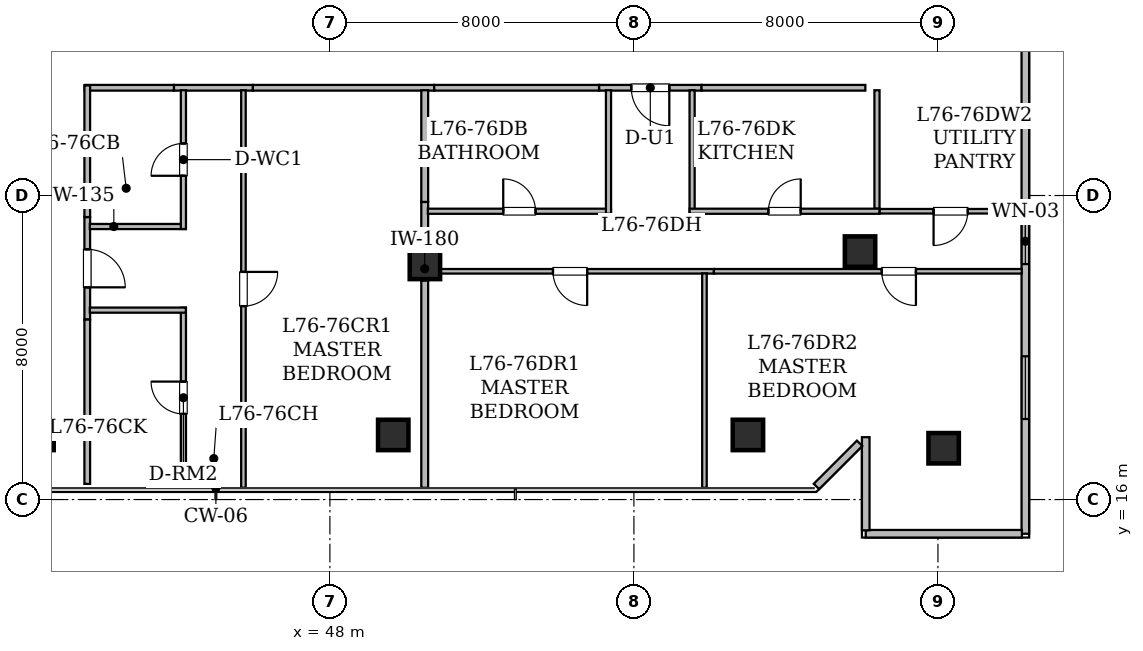
"""IFC4 building model, lengths in metres.
Left out: names, types, materials, properties, quantities, classifications, styles, units other than length and angle.
Written with IfcOpenShell. Run it as: python <this file> out.ifc"""

import sys

from ifc_helpers import new_model, si_unit, direction, frame, frame_2d, origin, origin_2d, place, context, subcontext, project, spatial, rectangle, hollow_rectangle, extrude, element, fill, save


model = new_model("IFC4")
c1 = context("Model", 3, precision=1e-05, world=origin(), true_north=direction((0.0, 1.0)))
c2 = subcontext(c1, "Body", "Model", "MODEL_VIEW")
j1 = project(units=[si_unit("LENGTHUNIT", "METRE"), si_unit("PLANEANGLEUNIT", "RADIAN")], contexts=[c1])
p1 = place(None, origin())
s1 = spatial("IfcSite", under=j1, at=p1, CompositionType="ELEMENT")
p2 = place(p1, origin())
s2 = spatial("IfcBuilding", under=s1, at=p2, CompositionType="ELEMENT")
p3 = place(p2, frame((0.0, 0.0, 298.85)))
s3 = spatial("IfcBuildingStorey", under=s2, at=p3, CompositionType="ELEMENT", Elevation=298.85)
for number, where, z_axis, x_axis in (
    (1, (40.333, 17.7, 0.0), (0.0, 0.0, 1.0), (1.0, 0.0, 0.0)),
    (2, (49.667, 17.7, 0.0), (0.0, 0.0, 1.0), (1.0, 0.0, 0.0)),
    (3, (59.0, 17.7, 0.0), (0.0, 0.0, 1.0), (1.0, 0.0, 0.0)),
    (4, (61.95, 22.525, 0.0), (0.0, 0.0, 1.0), (1.0, 0.0, 0.0)),
    (5, (50.5, 22.2, 0.0), (0.0, 0.0, 1.0), (1.0, 0.0, 0.0)),
):
    element("IfcColumn", number, at=place(p3, frame(where, z_axis=z_axis, x_axis=x_axis)), inside=s3, PredefinedType="COLUMN", context=c2, shape_type="SweptSolid", body=[
        extrude(hollow_rectangle(XDim=0.8, YDim=0.8, WallThickness=0.04, at=origin_2d()), origin(), (0.0, 0.0, 1.0), 4.2),
    ])
p4 = place(p3, frame((64.15, 17.35, 0.0), z_axis=(0.0, 0.0, 1.0), x_axis=(1.0, 0.0, 0.0)))
e6 = element("IfcColumn", 6, at=p4, inside=s3, PredefinedType="COLUMN", context=c2, shape_type="SweptSolid", body=[
    extrude(hollow_rectangle(XDim=0.8, YDim=0.8, WallThickness=0.04, at=origin_2d()), origin(), (0.0, 0.0, 1.0), 4.175),
])
p5 = place(p3, frame((66.3, 40.81, 0.0), z_axis=(0.0, 0.0, 1.0), x_axis=(0.0, -1.0, 0.0)))
e7 = element("IfcWall", 7, at=p5, inside=s3, PredefinedType="STANDARD", context=c2, shape_type="SweptSolid", body=[
    extrude(rectangle(XDim=25.71, YDim=0.2, at=frame_2d((12.855, 0.0))), origin(), (0.0, 0.0, 1.0), 3.33),
])
p6 = place(p5, frame((5.39, 0.0, 0.85)))
e8 = element("IfcOpeningElement", 8, at=p6, cuts=e7, PredefinedType="OPENING", context=c2, shape_type="SweptSolid", body=[
    extrude(rectangle(XDim=1.65, YDim=1.55, at=frame_2d((0.825, 0.775))), frame((0.0, 0.11, 0.0), z_axis=(0.0, -1.0, 0.0), x_axis=(1.0, 0.0, 0.0)), (0.0, 0.0, 1.0), 0.22),
])
p7 = place(p5, frame((17.414, 0.0, 0.8)))
e9 = element("IfcOpeningElement", 9, at=p7, cuts=e7, PredefinedType="OPENING", context=c2, shape_type="SweptSolid", body=[
    extrude(rectangle(XDim=1.2, YDim=1.5, at=frame_2d((0.6, 0.75))), frame((0.0, 0.11, 0.0), z_axis=(0.0, -1.0, 0.0), x_axis=(1.0, 0.0, 0.0)), (0.0, 0.0, 1.0), 0.22),
])
p8 = place(p5, frame((21.04, 0.0, 0.85)))
e10 = element("IfcOpeningElement", 10, at=p8, cuts=e7, PredefinedType="OPENING", context=c2, shape_type="SweptSolid", body=[
    extrude(rectangle(XDim=1.65, YDim=1.55, at=frame_2d((0.825, 0.775))), frame((0.0, 0.11, 0.0), z_axis=(0.0, -1.0, 0.0), x_axis=(1.0, 0.0, 0.0)), (0.0, 0.0, 1.0), 0.22),
])
p9 = place(p3, frame((66.21, 15.1, 0.0), z_axis=(0.0, 0.0, 1.0), x_axis=(-1.0, 0.0, 0.0)))
e11 = element("IfcWall", 11, at=p9, inside=s3, PredefinedType="STANDARD", context=c2, shape_type="SweptSolid", body=[
    extrude(rectangle(XDim=4.11, YDim=0.2, at=frame_2d((2.055, 0.0))), origin(), (0.0, 0.0, 1.0), 3.33),
])
p10 = place(p3, frame((62.1, 15.19, 0.0), z_axis=(0.0, 0.0, 1.0), x_axis=(0.0, 1.0, 0.0)))
e12 = element("IfcWall", 12, at=p10, inside=s3, PredefinedType="STANDARD", context=c2, shape_type="SweptSolid", body=[
    extrude(rectangle(XDim=2.451, YDim=0.2, at=frame_2d((1.226, 0.0))), origin(), (0.0, 0.0, 1.0), 3.33),
])
p11 = place(p3, frame((61.939, 17.48, 0.0), z_axis=(0.0, 0.0, 1.0), x_axis=(-0.707106781187, -0.707106781187, 0.0)))
e13 = element("IfcWall", 13, at=p11, inside=s3, PredefinedType="STANDARD", context=c2, shape_type="SweptSolid", body=[
    extrude(rectangle(XDim=1.606, YDim=0.2, at=frame_2d((0.803, 0.0))), origin(), (0.0, 0.0, 1.0), 3.33),
])
p12 = place(p3, frame((45.974, 26.835, 0.0), z_axis=(0.0, 0.0, 1.0), x_axis=(-1.0, 0.0, 0.0)))
e14 = element("IfcWall", 14, at=p12, inside=s3, PredefinedType="STANDARD", context=c2, shape_type="SweptSolid", body=[
    extrude(rectangle(XDim=2.078, YDim=0.15, at=frame_2d((1.039, 0.0))), origin(), (0.0, 0.0, 1.0), 3.88),
])
p13 = place(p3, frame((41.615, 23.433, 0.0), z_axis=(0.0, 0.0, 1.0), x_axis=(0.0, -1.0, 0.0)))
e15 = element("IfcWall", 15, at=p13, inside=s3, PredefinedType="STANDARD", context=c2, shape_type="SweptSolid", body=[
    extrude(rectangle(XDim=2.698, YDim=0.15, at=frame_2d((1.349, 0.0))), origin(), (0.0, 0.0, 1.0), 3.88),
])
p14 = place(p13, frame((0.849, 0.0, 0.0)))
e16 = element("IfcOpeningElement", 16, at=p14, cuts=e15, PredefinedType="OPENING", context=c2, shape_type="SweptSolid", body=[
    extrude(rectangle(XDim=1.0, YDim=2.15, at=frame_2d((0.5, 1.075))), frame((0.0, 0.085, 0.0), z_axis=(0.0, -1.0, 0.0), x_axis=(1.0, 0.0, 0.0)), (0.0, 0.0, 1.0), 0.17),
])
p15 = place(p3, frame((43.896, 26.835, 0.0), z_axis=(0.0, 0.0, 1.0), x_axis=(-1.0, 0.0, 0.0)))
e17 = element("IfcWall", 17, at=p15, inside=s3, PredefinedType="STANDARD", context=c2, shape_type="SweptSolid", body=[
    extrude(rectangle(XDim=2.346, YDim=0.15, at=frame_2d((1.173, 0.0))), origin(), (0.0, 0.0, 1.0), 3.88),
])
p16 = place(p3, frame((41.615, 26.898, 0.0), z_axis=(0.0, 0.0, 1.0), x_axis=(0.0, -1.0, 0.0)))
e18 = element("IfcWall", 18, at=p16, inside=s3, PredefinedType="STANDARD", context=c2, shape_type="SweptSolid", body=[
    extrude(rectangle(XDim=3.465, YDim=0.15, at=frame_2d((1.732, 0.0))), origin(), (0.0, 0.0, 1.0), 3.175),
])
p17 = place(p3, frame((41.615, 20.735, 0.0), z_axis=(0.0, 0.0, 1.0), x_axis=(0.0, -1.0, 0.0)))
e19 = element("IfcWall", 19, at=p17, inside=s3, PredefinedType="STANDARD", context=c2, shape_type="SweptSolid", body=[
    extrude(rectangle(XDim=4.323, YDim=0.15, at=frame_2d((2.162, 0.0))), origin(), (0.0, 0.0, 1.0), 3.337),
])
p18 = place(p3, frame((50.744, 26.835, 0.0), z_axis=(0.0, 0.0, 1.0), x_axis=(-1.0, 0.0, 0.0)))
e20 = element("IfcWall", 20, at=p18, inside=s3, PredefinedType="STANDARD", context=c2, shape_type="SweptSolid", body=[
    extrude(rectangle(XDim=4.77, YDim=0.15, at=frame_2d((2.385, 0.0))), origin(), (0.0, 0.0, 1.0), 3.175),
])
p19 = place(p3, frame((57.78, 26.835, 0.0), z_axis=(0.0, 0.0, 1.0), x_axis=(-1.0, 0.0, 0.0)))
e21 = element("IfcWall", 21, at=p19, inside=s3, PredefinedType="STANDARD", context=c2, shape_type="SweptSolid", body=[
    extrude(rectangle(XDim=2.698, YDim=0.15, at=frame_2d((1.349, 0.0))), origin(), (0.0, 0.0, 1.0), 3.88),
])
p20 = place(p19, frame((0.849, 0.0, 0.0)))
e22 = element("IfcOpeningElement", 22, at=p20, cuts=e21, PredefinedType="OPENING", context=c2, shape_type="SweptSolid", body=[
    extrude(rectangle(XDim=1.0, YDim=2.15, at=frame_2d((0.5, 1.075))), frame((0.0, 0.085, 0.0), z_axis=(0.0, -1.0, 0.0), x_axis=(1.0, 0.0, 0.0)), (0.0, 0.0, 1.0), 0.17),
])
p21 = place(p3, frame((55.082, 26.835, 0.0), z_axis=(0.0, 0.0, 1.0), x_axis=(-1.0, 0.0, 0.0)))
e23 = element("IfcWall", 23, at=p21, inside=s3, PredefinedType="STANDARD", context=c2, shape_type="SweptSolid", body=[
    extrude(rectangle(XDim=4.338, YDim=0.15, at=frame_2d((2.169, 0.0))), origin(), (0.0, 0.0, 1.0), 3.88),
])
p22 = place(p3, frame((62.09, 26.835, 0.0), z_axis=(0.0, 0.0, 1.0), x_axis=(-1.0, 0.0, 0.0)))
e24 = element("IfcWall", 24, at=p22, inside=s3, PredefinedType="STANDARD", context=c2, shape_type="SweptSolid", body=[
    extrude(rectangle(XDim=4.31, YDim=0.15, at=frame_2d((2.155, 0.0))), origin(), (0.0, 0.0, 1.0), 3.337),
])
p23 = place(p3, frame((41.682, 23.184, 0.0), z_axis=(0.0, 0.0, 1.0), x_axis=(1.0, 0.0, 0.0)))
e25 = element("IfcWall", 25, at=p23, inside=s3, PredefinedType="PARTITIONING", context=c2, shape_type="SweptSolid", body=[
    extrude(rectangle(XDim=2.528, YDim=0.135, at=frame_2d((1.264, 0.0))), origin(), (0.0, 0.0, 1.0), 3.175),
])
p24 = place(p3, frame((44.145, 23.119, 0.0), z_axis=(0.0, 0.0, 1.0), x_axis=(0.0, 1.0, 0.0)))
e26 = element("IfcWall", 26, at=p24, inside=s3, PredefinedType="PARTITIONING", context=c2, shape_type="SweptSolid", body=[
    extrude(rectangle(XDim=3.651, YDim=0.135, at=frame_2d((1.826, 0.0))), origin(), (0.0, 0.0, 1.0), 3.175),
])
p25 = place(p24, frame((1.4, 0.0, 0.0)))
e27 = element("IfcOpeningElement", 27, at=p25, cuts=e26, PredefinedType="OPENING", context=c2, shape_type="SweptSolid", body=[
    extrude(rectangle(XDim=0.85, YDim=2.1, at=frame_2d((0.425, 1.05))), frame((0.0, 0.077, 0.0), z_axis=(0.0, -1.0, 0.0), x_axis=(1.0, 0.0, 0.0)), (0.0, 0.0, 1.0), 0.155),
])
p26 = place(p3, frame((44.145, 16.31, 0.0), z_axis=(0.0, 0.0, 1.0), x_axis=(0.0, 1.0, 0.0)))
e28 = element("IfcWall", 28, at=p26, inside=s3, PredefinedType="PARTITIONING", context=c2, shape_type="SweptSolid", body=[
    extrude(rectangle(XDim=4.739, YDim=0.135, at=frame_2d((2.37, 0.0))), origin(), (0.0, 0.0, 1.0), 3.337),
])
p27 = place(p26, frame((1.944, 0.0, 0.0)))
e29 = element("IfcOpeningElement", 29, at=p27, cuts=e28, PredefinedType="OPENING", context=c2, shape_type="SweptSolid", body=[
    extrude(rectangle(XDim=0.85, YDim=2.1, at=frame_2d((0.425, 1.05))), frame((0.0, 0.077, 0.0), z_axis=(0.0, -1.0, 0.0), x_axis=(1.0, 0.0, 0.0)), (0.0, 0.0, 1.0), 0.155),
])
p28 = place(p3, frame((44.21, 20.984, 0.0), z_axis=(0.0, 0.0, 1.0), x_axis=(-1.0, 0.0, 0.0)))
e30 = element("IfcWall", 30, at=p28, inside=s3, PredefinedType="PARTITIONING", context=c2, shape_type="SweptSolid", body=[
    extrude(rectangle(XDim=2.528, YDim=0.135, at=frame_2d((1.264, 0.0))), origin(), (0.0, 0.0, 1.0), 3.88),
])
p29 = place(p3, frame((45.725, 26.77, 0.0), z_axis=(0.0, 0.0, 1.0), x_axis=(0.0, -1.0, 0.0)))
e31 = element("IfcWall", 31, at=p29, inside=s3, PredefinedType="PARTITIONING", context=c2, shape_type="SweptSolid", body=[
    extrude(rectangle(XDim=10.46, YDim=0.12, at=frame_2d((5.23, 0.0))), origin(), (0.0, 0.0, 1.0), 3.175),
])
p30 = place(p29, frame((4.78, 0.0, 0.0)))
e32 = element("IfcOpeningElement", 32, at=p30, cuts=e31, PredefinedType="OPENING", context=c2, shape_type="SweptSolid", body=[
    extrude(rectangle(XDim=0.9, YDim=2.1, at=frame_2d((0.45, 1.05))), frame((0.0, 0.07, 0.0), z_axis=(0.0, -1.0, 0.0), x_axis=(1.0, 0.0, 0.0)), (0.0, 0.0, 1.0), 0.14),
])
p31 = place(p3, frame((50.495, 23.831, 0.0), z_axis=(0.0, 0.0, 1.0), x_axis=(0.0, -1.0, 0.0)))
e33 = element("IfcWall", 33, at=p31, inside=s3, PredefinedType="STANDARD", context=c2, shape_type="SweptSolid", body=[
    extrude(rectangle(XDim=2.069, YDim=0.18, at=frame_2d((1.035, 0.0))), origin(), (0.0, 0.0, 1.0), 3.175),
])
p32 = place(p3, frame((50.495, 26.77, 0.0), z_axis=(0.0, 0.0, 1.0), x_axis=(0.0, -1.0, 0.0)))
e34 = element("IfcWall", 34, at=p32, inside=s3, PredefinedType="STANDARD", context=c2, shape_type="SweptSolid", body=[
    extrude(rectangle(XDim=2.939, YDim=0.18, at=frame_2d((1.469, 0.0))), origin(), (0.0, 0.0, 1.0), 3.175),
])
p33 = place(p3, frame((50.495, 21.762, 0.0), z_axis=(0.0, 0.0, 1.0), x_axis=(0.0, -1.0, 0.0)))
e35 = element("IfcWall", 35, at=p33, inside=s3, PredefinedType="STANDARD", context=c2, shape_type="SweptSolid", body=[
    extrude(rectangle(XDim=5.452, YDim=0.18, at=frame_2d((2.726, 0.0))), origin(), (0.0, 0.0, 1.0), 3.175),
])
p34 = place(p3, frame((66.208, 23.586, 0.0), z_axis=(0.0, 0.0, 1.0), x_axis=(-1.0, 0.0, 0.0)))
e36 = element("IfcWall", 36, at=p34, inside=s3, PredefinedType="PARTITIONING", context=c2, shape_type="SweptSolid", body=[
    extrude(rectangle(XDim=3.747, YDim=0.12, at=frame_2d((1.874, 0.0))), origin(), (0.0, 0.0, 1.0), 3.175),
])
p35 = place(p34, frame((1.423, 0.0, 0.0)))
e37 = element("IfcOpeningElement", 37, at=p35, cuts=e36, PredefinedType="OPENING", context=c2, shape_type="SweptSolid", body=[
    extrude(rectangle(XDim=0.9, YDim=2.1, at=frame_2d((0.45, 1.05))), frame((0.0, 0.07, 0.0), z_axis=(0.0, -1.0, 0.0), x_axis=(1.0, 0.0, 0.0)), (0.0, 0.0, 1.0), 0.14),
])
p36 = place(p3, frame((62.396, 23.651, 0.0), z_axis=(0.0, 0.0, 1.0), x_axis=(0.0, 1.0, 0.0)))
e38 = element("IfcWall", 38, at=p36, inside=s3, PredefinedType="PARTITIONING", context=c2, shape_type="SweptSolid", body=[
    extrude(rectangle(XDim=3.119, YDim=0.135, at=frame_2d((1.56, 0.0))), origin(), (0.0, 0.0, 1.0), 3.88),
])
p37 = place(p3, frame((50.577, 23.586, 0.0), z_axis=(0.0, 0.0, 1.0), x_axis=(1.0, 0.0, 0.0)))
e39 = element("IfcWall", 39, at=p37, inside=s3, PredefinedType="PARTITIONING", context=c2, shape_type="SweptSolid", body=[
    extrude(rectangle(XDim=4.819, YDim=0.135, at=frame_2d((2.41, 0.0))), origin(), (0.0, 0.0, 1.0), 3.175),
])
p38 = place(p37, frame((1.984, 0.0, 0.0)))
e40 = element("IfcOpeningElement", 40, at=p38, cuts=e39, PredefinedType="OPENING", context=c2, shape_type="SweptSolid", body=[
    extrude(rectangle(XDim=0.85, YDim=2.1, at=frame_2d((0.425, 1.05))), frame((0.0, 0.077, 0.0), z_axis=(0.0, -1.0, 0.0), x_axis=(1.0, 0.0, 0.0)), (0.0, 0.0, 1.0), 0.155),
])
for number, where, z_axis, x_axis in (
    (41, (55.331, 23.521, 0.0), (0.0, 0.0, 1.0), (0.0, 1.0, 0.0)),
    (42, (57.531, 26.77, 0.0), (0.0, 0.0, 1.0), (0.0, -1.0, 0.0)),
):
    element("IfcWall", number, at=place(p3, frame(where, z_axis=z_axis, x_axis=x_axis)), inside=s3, PredefinedType="PARTITIONING", context=c2, shape_type="SweptSolid", body=[
        extrude(rectangle(XDim=3.249, YDim=0.135, at=frame_2d((1.625, 0.0))), origin(), (0.0, 0.0, 1.0), 3.88),
    ])
p39 = place(p3, frame((57.466, 23.586, 0.0), z_axis=(0.0, 0.0, 1.0), x_axis=(1.0, 0.0, 0.0)))
e43 = element("IfcWall", 43, at=p39, inside=s3, PredefinedType="PARTITIONING", context=c2, shape_type="SweptSolid", body=[
    extrude(rectangle(XDim=4.995, YDim=0.135, at=frame_2d((2.498, 0.0))), origin(), (0.0, 0.0, 1.0), 3.337),
])
p40 = place(p39, frame((2.073, 0.0, 0.0)))
e44 = element("IfcOpeningElement", 44, at=p40, cuts=e43, PredefinedType="OPENING", context=c2, shape_type="SweptSolid", body=[
    extrude(rectangle(XDim=0.85, YDim=2.1, at=frame_2d((0.425, 1.05))), frame((0.0, 0.077, 0.0), z_axis=(0.0, -1.0, 0.0), x_axis=(1.0, 0.0, 0.0)), (0.0, 0.0, 1.0), 0.155),
])
p41 = place(p3, frame((58.105, 22.006, 0.0), z_axis=(0.0, 0.0, 1.0), x_axis=(-1.0, 0.0, 0.0)))
e45 = element("IfcWall", 45, at=p41, inside=s3, PredefinedType="PARTITIONING", context=c2, shape_type="SweptSolid", body=[
    extrude(rectangle(XDim=7.528, YDim=0.12, at=frame_2d((3.764, 0.0))), origin(), (0.0, 0.0, 1.0), 3.175),
])
p42 = place(p41, frame((3.335, 0.0, 0.0)))
e46 = element("IfcOpeningElement", 46, at=p42, cuts=e45, PredefinedType="OPENING", context=c2, shape_type="SweptSolid", body=[
    extrude(rectangle(XDim=0.9, YDim=2.1, at=frame_2d((0.45, 1.05))), frame((0.0, 0.07, 0.0), z_axis=(0.0, -1.0, 0.0), x_axis=(1.0, 0.0, 0.0)), (0.0, 0.0, 1.0), 0.14),
])
p43 = place(p3, frame((66.208, 22.006, 0.0), z_axis=(0.0, 0.0, 1.0), x_axis=(-1.0, 0.0, 0.0)))
e47 = element("IfcWall", 47, at=p43, inside=s3, PredefinedType="PARTITIONING", context=c2, shape_type="SweptSolid", body=[
    extrude(rectangle(XDim=8.103, YDim=0.12, at=frame_2d((4.052, 0.0))), origin(), (0.0, 0.0, 1.0), 3.175),
])
p44 = place(p43, frame((2.787, 0.0, 0.0)))
e48 = element("IfcOpeningElement", 48, at=p44, cuts=e47, PredefinedType="OPENING", context=c2, shape_type="SweptSolid", body=[
    extrude(rectangle(XDim=0.9, YDim=2.1, at=frame_2d((0.45, 1.05))), frame((0.0, 0.07, 0.0), z_axis=(0.0, -1.0, 0.0), x_axis=(1.0, 0.0, 0.0)), (0.0, 0.0, 1.0), 0.14),
])
p45 = place(p3, frame((57.856, 21.952, 0.0), z_axis=(0.0, 0.0, 1.0), x_axis=(0.0, -1.0, 0.0)))
e49 = element("IfcWall", 49, at=p45, inside=s3, PredefinedType="PARTITIONING", context=c2, shape_type="SweptSolid", body=[
    extrude(rectangle(XDim=5.642, YDim=0.12, at=frame_2d((2.821, 0.0))), origin(), (0.0, 0.0, 1.0), 3.175),
])
p46 = place(p7, origin())
e50 = element("IfcWindow", 50, at=p46, inside=s3, PartitioningType="SINGLE_PANEL", PredefinedType="WINDOW", context=c2, shape_type="SweptSolid", body=[
    extrude(rectangle(XDim=1.2, YDim=1.5, at=frame_2d((0.6, 0.75))), frame((0.0, 0.03, 0.0), z_axis=(0.0, -1.0, 0.0), x_axis=(1.0, 0.0, 0.0)), (0.0, 0.0, 1.0), 0.06),
])
fill(e9, e50)
p47 = place(p8, origin())
e51 = element("IfcWindow", 51, at=p47, inside=s3, PartitioningType="SINGLE_PANEL", PredefinedType="WINDOW", context=c2, shape_type="SweptSolid", body=[
    extrude(rectangle(XDim=1.65, YDim=1.55, at=frame_2d((0.825, 0.775))), frame((0.0, 0.03, 0.0), z_axis=(0.0, -1.0, 0.0), x_axis=(1.0, 0.0, 0.0)), (0.0, 0.0, 1.0), 0.06),
])
fill(e10, e51)
p48 = place(p14, origin())
e52 = element("IfcDoor", 52, at=p48, inside=s3, OperationType="SINGLE_SWING_RIGHT", PredefinedType="DOOR", context=c2, shape_type="SweptSolid", body=[
    extrude(rectangle(XDim=1.0, YDim=2.15, at=frame_2d((0.5, 1.075))), frame((0.0, 0.025, 0.0), z_axis=(0.0, -1.0, 0.0), x_axis=(1.0, 0.0, 0.0)), (0.0, 0.0, 1.0), 0.05),
])
fill(e16, e52)
p49 = place(p20, origin())
e53 = element("IfcDoor", 53, at=p49, inside=s3, OperationType="SINGLE_SWING_LEFT", PredefinedType="DOOR", context=c2, shape_type="SweptSolid", body=[
    extrude(rectangle(XDim=1.0, YDim=2.15, at=frame_2d((0.5, 1.075))), frame((0.0, 0.025, 0.0), z_axis=(0.0, -1.0, 0.0), x_axis=(1.0, 0.0, 0.0)), (0.0, 0.0, 1.0), 0.05),
])
fill(e22, e53)
p50 = place(p25, origin())
e54 = element("IfcDoor", 54, at=p50, inside=s3, OperationType="SINGLE_SWING_LEFT", PredefinedType="DOOR", context=c2, shape_type="SweptSolid", body=[
    extrude(rectangle(XDim=0.85, YDim=2.1, at=frame_2d((0.425, 1.05))), frame((0.0, 0.025, 0.0), z_axis=(0.0, -1.0, 0.0), x_axis=(1.0, 0.0, 0.0)), (0.0, 0.0, 1.0), 0.05),
])
fill(e27, e54)
p51 = place(p27, origin())
e55 = element("IfcDoor", 55, at=p51, inside=s3, OperationType="SINGLE_SWING_RIGHT", PredefinedType="DOOR", context=c2, shape_type="SweptSolid", body=[
    extrude(rectangle(XDim=0.85, YDim=2.1, at=frame_2d((0.425, 1.05))), frame((0.0, 0.025, 0.0), z_axis=(0.0, -1.0, 0.0), x_axis=(1.0, 0.0, 0.0)), (0.0, 0.0, 1.0), 0.05),
])
fill(e29, e55)
p52 = place(p30, origin())
e56 = element("IfcDoor", 56, at=p52, inside=s3, OperationType="SINGLE_SWING_LEFT", PredefinedType="DOOR", context=c2, shape_type="SweptSolid", body=[
    extrude(rectangle(XDim=0.9, YDim=2.1, at=frame_2d((0.45, 1.05))), frame((0.0, 0.025, 0.0), z_axis=(0.0, -1.0, 0.0), x_axis=(1.0, 0.0, 0.0)), (0.0, 0.0, 1.0), 0.05),
])
fill(e32, e56)
p53 = place(p35, origin())
e57 = element("IfcDoor", 57, at=p53, inside=s3, OperationType="SINGLE_SWING_RIGHT", PredefinedType="DOOR", context=c2, shape_type="SweptSolid", body=[
    extrude(rectangle(XDim=0.9, YDim=2.1, at=frame_2d((0.45, 1.05))), frame((0.0, 0.025, 0.0), z_axis=(0.0, -1.0, 0.0), x_axis=(1.0, 0.0, 0.0)), (0.0, 0.0, 1.0), 0.05),
])
fill(e37, e57)
p54 = place(p38, origin())
e58 = element("IfcDoor", 58, at=p54, inside=s3, OperationType="SINGLE_SWING_LEFT", PredefinedType="DOOR", context=c2, shape_type="SweptSolid", body=[
    extrude(rectangle(XDim=0.85, YDim=2.1, at=frame_2d((0.425, 1.05))), frame((0.0, 0.025, 0.0), z_axis=(0.0, -1.0, 0.0), x_axis=(1.0, 0.0, 0.0)), (0.0, 0.0, 1.0), 0.05),
])
fill(e40, e58)
p55 = place(p40, origin())
e59 = element("IfcDoor", 59, at=p55, inside=s3, OperationType="SINGLE_SWING_RIGHT", PredefinedType="DOOR", context=c2, shape_type="SweptSolid", body=[
    extrude(rectangle(XDim=0.85, YDim=2.1, at=frame_2d((0.425, 1.05))), frame((0.0, 0.025, 0.0), z_axis=(0.0, -1.0, 0.0), x_axis=(1.0, 0.0, 0.0)), (0.0, 0.0, 1.0), 0.05),
])
fill(e44, e59)
p56 = place(p42, origin())
e60 = element("IfcDoor", 60, at=p56, inside=s3, OperationType="SINGLE_SWING_LEFT", PredefinedType="DOOR", context=c2, shape_type="SweptSolid", body=[
    extrude(rectangle(XDim=0.9, YDim=2.1, at=frame_2d((0.45, 1.05))), frame((0.0, 0.025, 0.0), z_axis=(0.0, -1.0, 0.0), x_axis=(1.0, 0.0, 0.0)), (0.0, 0.0, 1.0), 0.05),
])
fill(e46, e60)
p57 = place(p44, origin())
e61 = element("IfcDoor", 61, at=p57, inside=s3, OperationType="SINGLE_SWING_LEFT", PredefinedType="DOOR", context=c2, shape_type="SweptSolid", body=[
    extrude(rectangle(XDim=0.9, YDim=2.1, at=frame_2d((0.45, 1.05))), frame((0.0, 0.025, 0.0), z_axis=(0.0, -1.0, 0.0), x_axis=(1.0, 0.0, 0.0)), (0.0, 0.0, 1.0), 0.05),
])
fill(e48, e61)
save(model, sys.argv[1])
